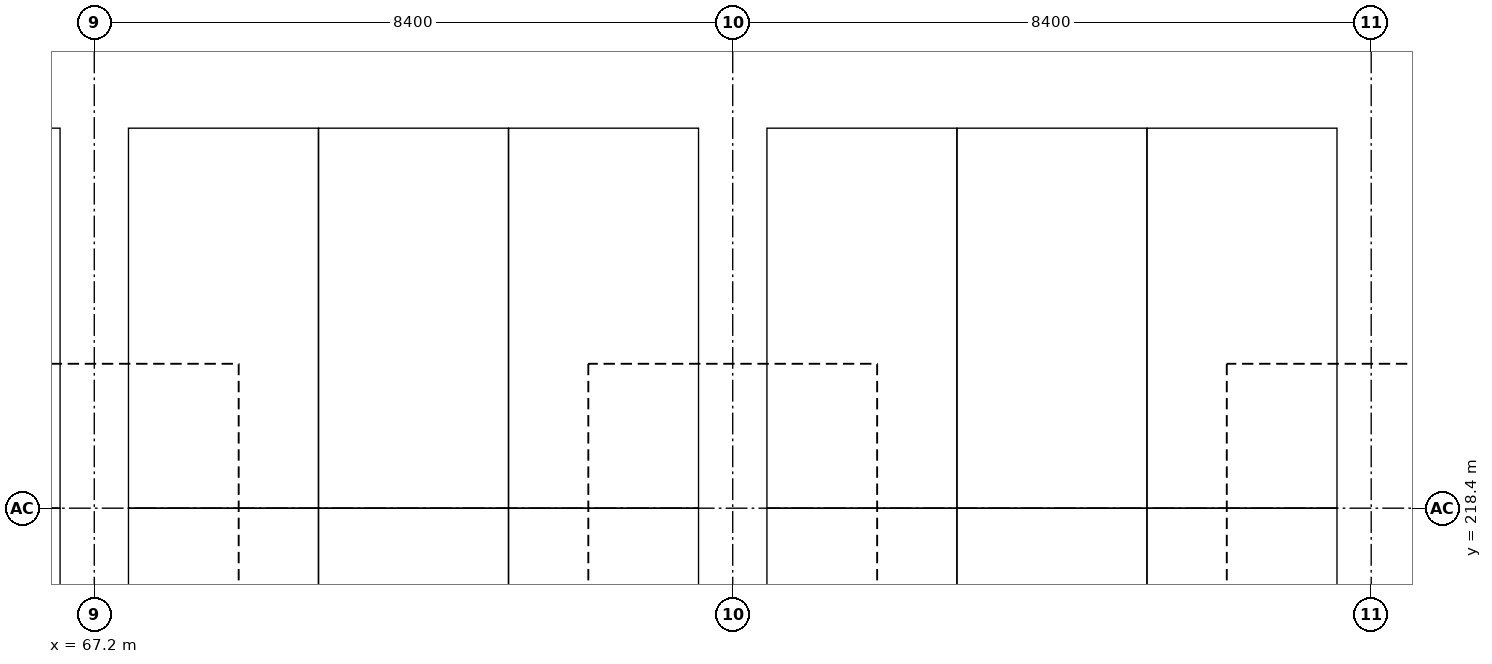
"""IFC4 building model, lengths in metres.
Left out: names, types, materials, properties, quantities, classifications, styles, units other than length and angle.
Written with IfcOpenShell. Run it as: python <this file> out.ifc"""

import sys

from ifc_helpers import new_model, si_unit, direction, frame, origin, origin_2d, place, context, subcontext, project, spatial, rectangle, extrude, element, save


model = new_model("IFC4")
c1 = context("Model", 3, precision=1e-05, world=origin(), true_north=direction((0.0, 1.0)))
c2 = subcontext(c1, "Body", "Model", "MODEL_VIEW")
j1 = project(units=[si_unit("LENGTHUNIT", "METRE"), si_unit("PLANEANGLEUNIT", "RADIAN")], contexts=[c1])
p1 = place(None, origin())
s1 = spatial("IfcSite", under=j1, at=p1, CompositionType="ELEMENT")
p2 = place(p1, origin())
s2 = spatial("IfcBuilding", under=s1, at=p2, CompositionType="ELEMENT")
p3 = place(p2, frame((0.0, 0.0, -3.0)))
s3 = spatial("IfcBuildingStorey", under=s2, at=p3, CompositionType="ELEMENT", Elevation=-3.0)
for number, where, z_axis, x_axis in (
    (1, (67.2, 218.4, 0.0), (0.0, 0.0, 1.0), (1.0, 0.0, 0.0)),
    (2, (75.6, 218.4, 0.0), (0.0, 0.0, 1.0), (1.0, 0.0, 0.0)),
    (3, (84.0, 218.4, 0.0), (0.0, 0.0, 1.0), (1.0, 0.0, 0.0)),
):
    element("IfcColumn", number, at=place(p3, frame(where, z_axis=z_axis, x_axis=x_axis)), inside=s3, PredefinedType="COLUMN", context=c2, shape_type="SweptSolid", body=[
        extrude(rectangle(XDim=0.8, YDim=0.8, at=origin_2d()), origin(), (0.0, 0.0, 1.0), 2.4),
    ])
save(model, sys.argv[1])
